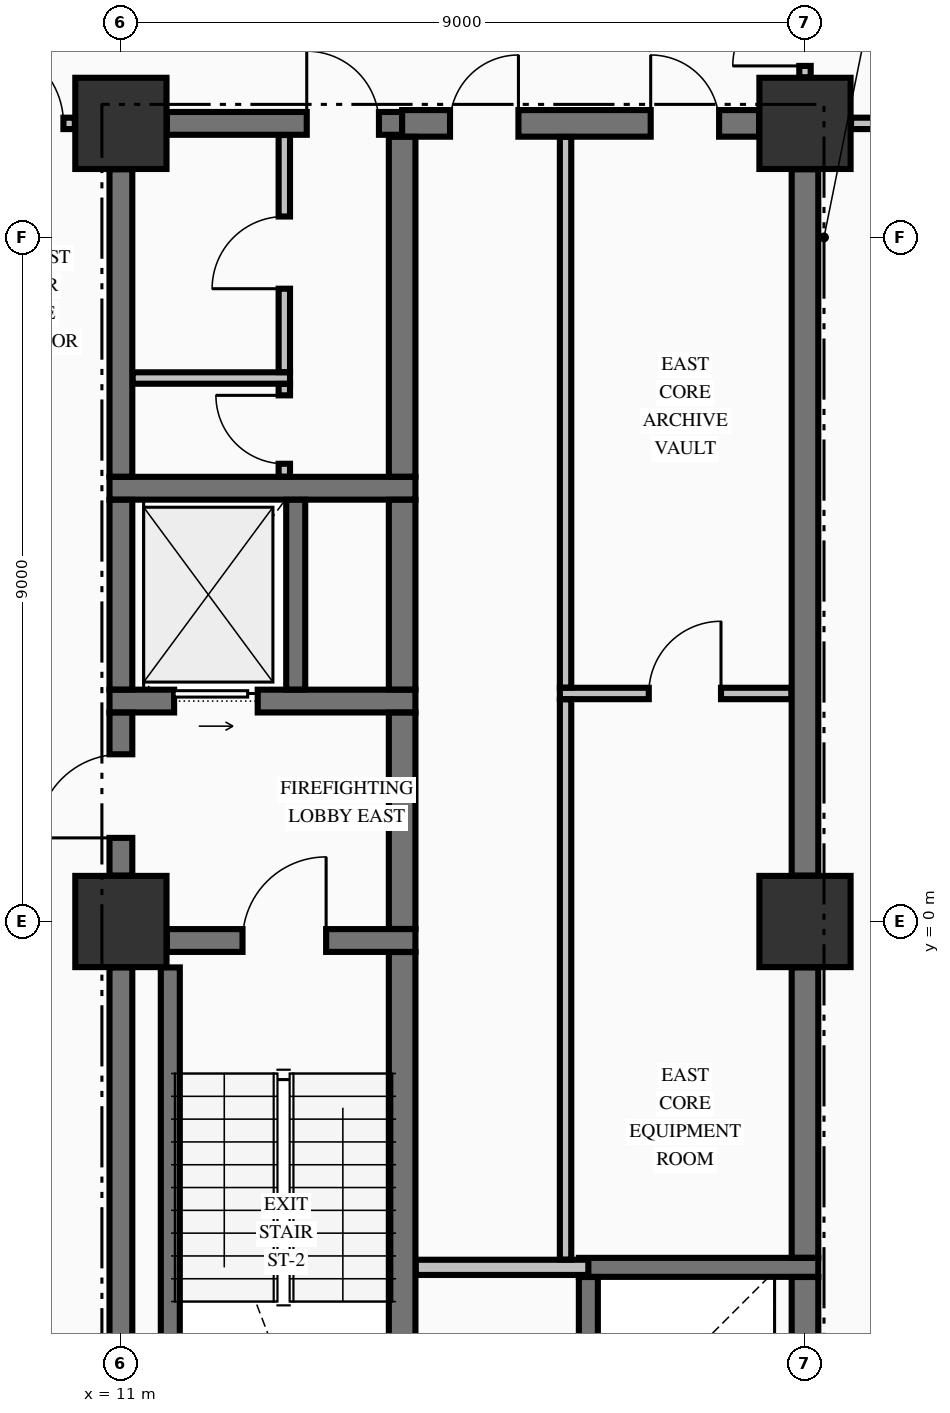
"""IFC4 building model, lengths in metres.
Left out: names, types, materials, properties, quantities, classifications, styles, units other than length and angle.
Written with IfcOpenShell. Run it as: python <this file> out.ifc"""

import sys

from ifc_helpers import new_model, si_unit, direction, frame, frame_2d, origin, origin_2d, place, context, subcontext, project, spatial, rectangle, extrude, element, fill, save


model = new_model("IFC4")
c1 = context("Model", 3, precision=1e-05, world=origin(), true_north=direction((0.0, 1.0)))
c2 = subcontext(c1, "Body", "Model", "MODEL_VIEW")
j1 = project(units=[si_unit("LENGTHUNIT", "METRE"), si_unit("PLANEANGLEUNIT", "RADIAN")], contexts=[c1])
p1 = place(None, origin())
s1 = spatial("IfcSite", under=j1, at=p1, CompositionType="ELEMENT")
p2 = place(p1, origin())
s2 = spatial("IfcBuilding", under=s1, at=p2, CompositionType="ELEMENT")
p3 = place(p2, frame((0.0, 0.0, 41.48)))
s3 = spatial("IfcBuildingStorey", under=s2, at=p3, CompositionType="ELEMENT", Elevation=41.48)
for number, where, z_axis, x_axis in (
    (1, (11.0, 0.0, -0.25), (0.0, 0.0, 1.0), (1.0, 0.0, 0.0)),
    (2, (11.0, 10.5, -0.25), (0.0, 0.0, 1.0), (1.0, 0.0, 0.0)),
    (3, (20.0, 10.5, -0.25), (0.0, 0.0, 1.0), (1.0, 0.0, 0.0)),
    (4, (20.0, 0.0, -0.25), (0.0, 0.0, 1.0), (1.0, 0.0, 0.0)),
):
    element("IfcColumn", number, at=place(p3, frame(where, z_axis=z_axis, x_axis=x_axis)), inside=s3, PredefinedType="COLUMN", context=c2, shape_type="SweptSolid", body=[
        extrude(rectangle(XDim=1.2, YDim=1.2, at=origin_2d()), origin(), (0.0, 0.0, 1.0), 3.57),
    ])
p4 = place(p3, frame((17.025, -4.55, 0.0), z_axis=(0.0, 0.0, 1.0), x_axis=(1.0, 0.0, 0.0)))
e5 = element("IfcWall", 5, at=p4, inside=s3, PredefinedType="SOLIDWALL", context=c2, shape_type="SweptSolid", body=[
    extrude(rectangle(XDim=3.15, YDim=0.25, at=frame_2d((1.575, 0.0))), origin(), (0.0, 0.0, 1.0), 3.32),
])
p5 = place(p3, frame((11.604, -0.25, 0.0), z_axis=(0.0, 0.0, 1.0), x_axis=(1.0, 0.0, 0.0)))
e6 = element("IfcWall", 6, at=p5, inside=s3, PredefinedType="SHEAR", context=c2, shape_type="SweptSolid", body=[
    extrude(rectangle(XDim=3.271, YDim=0.3, at=frame_2d((1.635, 0.0))), origin(), (0.0, 0.0, 1.0), 3.32),
])
p6 = place(p5, frame((0.996, 0.0, 0.0)))
e7 = element("IfcOpeningElement", 7, at=p6, cuts=e6, PredefinedType="OPENING", context=c2, shape_type="SweptSolid", body=[
    extrude(rectangle(XDim=1.1, YDim=2.15, at=frame_2d((0.55, 1.075))), frame((0.0, 0.16, 0.0), z_axis=(0.0, -1.0, 0.0), x_axis=(1.0, 0.0, 0.0)), (0.0, 0.0, 1.0), 0.32),
])
p7 = place(p3, frame((10.85, 2.9, 0.0), z_axis=(0.0, 0.0, 1.0), x_axis=(1.0, 0.0, 0.0)))
e8 = element("IfcWall", 8, at=p7, inside=s3, PredefinedType="SHEAR", context=c2, shape_type="SweptSolid", body=[
    extrude(rectangle(XDim=4.025, YDim=0.3, at=frame_2d((2.012, 0.0))), origin(), (0.0, 0.0, 1.0), 3.32),
])
p8 = place(p7, frame((0.85, 0.0, 0.0)))
e9 = element("IfcOpeningElement", 9, at=p8, cuts=e8, PredefinedType="OPENING", context=c2, shape_type="SweptSolid", body=[
    extrude(rectangle(XDim=1.1, YDim=2.2, at=frame_2d((0.55, 1.1))), frame((0.0, 0.16, 0.0), z_axis=(0.0, -1.0, 0.0), x_axis=(1.0, 0.0, 0.0)), (0.0, 0.0, 1.0), 0.32),
])
p9 = place(p3, frame((10.85, 5.7, 0.0), z_axis=(0.0, 0.0, 1.0), x_axis=(1.0, 0.0, 0.0)))
e10 = element("IfcWall", 10, at=p9, inside=s3, PredefinedType="SHEAR", context=c2, shape_type="SweptSolid", body=[
    extrude(rectangle(XDim=4.025, YDim=0.3, at=frame_2d((2.012, 0.0))), origin(), (0.0, 0.0, 1.0), 3.32),
])
p10 = place(p3, frame((11.604, 10.5, 0.0), z_axis=(0.0, 0.0, 1.0), x_axis=(1.0, 0.0, 0.0)))
e11 = element("IfcWall", 11, at=p10, inside=s3, PredefinedType="SHEAR", context=c2, shape_type="SweptSolid", body=[
    extrude(rectangle(XDim=3.096, YDim=0.3, at=frame_2d((1.548, 0.0))), origin(), (0.0, 0.0, 1.0), 3.32),
])
p11 = place(p10, frame((1.841, 0.0, 0.0)))
e12 = element("IfcOpeningElement", 12, at=p11, cuts=e11, PredefinedType="OPENING", context=c2, shape_type="SweptSolid", body=[
    extrude(rectangle(XDim=0.95, YDim=2.15, at=frame_2d((0.475, 1.075))), frame((0.0, 0.16, 0.0), z_axis=(0.0, -1.0, 0.0), x_axis=(1.0, 0.0, 0.0)), (0.0, 0.0, 1.0), 0.32),
])
p12 = place(p3, frame((14.7, 10.5, 0.0), z_axis=(0.0, 0.0, 1.0), x_axis=(1.0, 0.0, 0.0)))
e13 = element("IfcWall", 13, at=p12, inside=s3, PredefinedType="SHEAR", context=c2, shape_type="SweptSolid", body=[
    extrude(rectangle(XDim=4.696, YDim=0.35, at=frame_2d((2.348, 0.0))), origin(), (0.0, 0.0, 1.0), 3.32),
])
p13 = place(p12, frame((0.63, 0.0, 0.0)))
e14 = element("IfcOpeningElement", 14, at=p13, cuts=e13, PredefinedType="OPENING", context=c2, shape_type="SweptSolid", body=[
    extrude(rectangle(XDim=0.9, YDim=2.15, at=frame_2d((0.45, 1.075))), frame((0.0, 0.185, 0.0), z_axis=(0.0, -1.0, 0.0), x_axis=(1.0, 0.0, 0.0)), (0.0, 0.0, 1.0), 0.37),
])
p14 = place(p12, frame((3.27, 0.0, 0.0)))
e15 = element("IfcOpeningElement", 15, at=p14, cuts=e13, PredefinedType="OPENING", context=c2, shape_type="SweptSolid", body=[
    extrude(rectangle(XDim=0.9, YDim=2.15, at=frame_2d((0.45, 1.075))), frame((0.0, 0.185, 0.0), z_axis=(0.0, -1.0, 0.0), x_axis=(1.0, 0.0, 0.0)), (0.0, 0.0, 1.0), 0.37),
])
p15 = place(p3, frame((14.878, -4.55, 0.0), z_axis=(0.0, 0.0, 1.0), x_axis=(1.0, 0.0, 0.0)))
e16 = element("IfcWall", 16, at=p15, inside=s3, PredefinedType="PARTITIONING", context=c2, shape_type="SweptSolid", body=[
    extrude(rectangle(XDim=2.272, YDim=0.2, at=frame_2d((1.136, 0.0))), origin(), (0.0, 0.0, 1.0), 3.32),
])
p16 = place(p3, frame((16.775, 3.0, 0.0), z_axis=(0.0, 0.0, 1.0), x_axis=(1.0, 0.0, 0.0)))
e17 = element("IfcWall", 17, at=p16, inside=s3, PredefinedType="PARTITIONING", context=c2, shape_type="SweptSolid", body=[
    extrude(rectangle(XDim=3.047, YDim=0.15, at=frame_2d((1.523, 0.0))), origin(), (0.0, 0.0, 1.0), 3.32),
])
p17 = place(p16, frame((1.17, 0.0, 0.0)))
e18 = element("IfcOpeningElement", 18, at=p17, cuts=e17, PredefinedType="OPENING", context=c2, shape_type="SweptSolid", body=[
    extrude(rectangle(XDim=0.95, YDim=2.15, at=frame_2d((0.475, 1.075))), frame((0.0, 0.085, 0.0), z_axis=(0.0, -1.0, 0.0), x_axis=(1.0, 0.0, 0.0)), (0.0, 0.0, 1.0), 0.17),
])
p18 = place(p3, frame((11.153, 7.15, 0.0), z_axis=(0.0, 0.0, 1.0), x_axis=(1.0, 0.0, 0.0)))
e19 = element("IfcWall", 19, at=p18, inside=s3, PredefinedType="PARTITIONING", context=c2, shape_type="SweptSolid", body=[
    extrude(rectangle(XDim=2.072, YDim=0.15, at=frame_2d((1.036, 0.0))), origin(), (0.0, 0.0, 1.0), 3.32),
])
p19 = place(p3, frame((-10.394, 10.5, 0.0), z_axis=(0.0, 0.0, 1.0), x_axis=(1.0, 0.0, 0.0)))
e20 = element("IfcWall", 20, at=p19, inside=s3, PredefinedType="PARTITIONING", context=c2, shape_type="SweptSolid", body=[
    extrude(rectangle(XDim=20.788, YDim=0.15, at=frame_2d((10.394, 0.0))), origin(), (0.0, 0.0, 1.0), 3.32),
])
p20 = place(p19, frame((0.15, 0.0, 0.0)))
e21 = element("IfcOpeningElement", 21, at=p20, cuts=e20, PredefinedType="OPENING", context=c2, shape_type="SweptSolid", body=[
    extrude(rectangle(XDim=1.05, YDim=2.15, at=frame_2d((0.525, 1.075))), frame((0.0, 0.085, 0.0), z_axis=(0.0, -1.0, 0.0), x_axis=(1.0, 0.0, 0.0)), (0.0, 0.0, 1.0), 0.17),
])
p21 = place(p19, frame((19.588, 0.0, 0.0)))
e22 = element("IfcOpeningElement", 22, at=p21, cuts=e20, PredefinedType="OPENING", context=c2, shape_type="SweptSolid", body=[
    extrude(rectangle(XDim=1.05, YDim=2.15, at=frame_2d((0.525, 1.075))), frame((0.0, 0.085, 0.0), z_axis=(0.0, -1.0, 0.0), x_axis=(1.0, 0.0, 0.0)), (0.0, 0.0, 1.0), 0.17),
])
p22 = place(p3, frame((20.606, 10.5, 0.0), z_axis=(0.0, 0.0, 1.0), x_axis=(1.0, 0.0, 0.0)))
e23 = element("IfcWall", 23, at=p22, inside=s3, PredefinedType="PARTITIONING", context=c2, shape_type="SweptSolid", body=[
    extrude(rectangle(XDim=8.229, YDim=0.15, at=frame_2d((4.115, 0.0))), origin(), (0.0, 0.0, 1.0), 3.32),
])
p23 = place(p22, frame((3.394, 0.0, 0.0)))
e24 = element("IfcOpeningElement", 24, at=p23, cuts=e23, PredefinedType="OPENING", context=c2, shape_type="SweptSolid", body=[
    extrude(rectangle(XDim=1.0, YDim=2.15, at=frame_2d((0.5, 1.075))), frame((0.0, 0.085, 0.0), z_axis=(0.0, -1.0, 0.0), x_axis=(1.0, 0.0, 0.0)), (0.0, 0.0, 1.0), 0.17),
])
p24 = place(p3, frame((11.0, -9.346, 0.0), z_axis=(0.0, 0.0, 1.0), x_axis=(0.0, 1.0, 0.0)))
e25 = element("IfcWall", 25, at=p24, inside=s3, PredefinedType="SHEAR", context=c2, shape_type="SweptSolid", body=[
    extrude(rectangle(XDim=8.742, YDim=0.3, at=frame_2d((4.371, 0.0))), origin(), (0.0, 0.0, 1.0), 3.32),
])
p25 = place(p3, frame((11.0, 0.604, 0.0), z_axis=(0.0, 0.0, 1.0), x_axis=(0.0, 1.0, 0.0)))
e26 = element("IfcWall", 26, at=p25, inside=s3, PredefinedType="SHEAR", context=c2, shape_type="SweptSolid", body=[
    extrude(rectangle(XDim=2.144, YDim=0.3, at=frame_2d((1.072, 0.0))), origin(), (0.0, 0.0, 1.0), 3.32),
])
p26 = place(p25, frame((0.496, 0.0, 0.0)))
e27 = element("IfcOpeningElement", 27, at=p26, cuts=e26, PredefinedType="OPENING", context=c2, shape_type="SweptSolid", body=[
    extrude(rectangle(XDim=1.1, YDim=2.15, at=frame_2d((0.55, 1.075))), frame((0.0, 0.16, 0.0), z_axis=(0.0, -1.0, 0.0), x_axis=(1.0, 0.0, 0.0)), (0.0, 0.0, 1.0), 0.32),
])
p27 = place(p3, frame((11.0, 3.052, 0.0), z_axis=(0.0, 0.0, 1.0), x_axis=(0.0, 1.0, 0.0)))
e28 = element("IfcWall", 28, at=p27, inside=s3, PredefinedType="SHEAR", context=c2, shape_type="SweptSolid", body=[
    extrude(rectangle(XDim=2.496, YDim=0.3, at=frame_2d((1.248, 0.0))), origin(), (0.0, 0.0, 1.0), 3.32),
])
p28 = place(p3, frame((11.0, 5.852, 0.0), z_axis=(0.0, 0.0, 1.0), x_axis=(0.0, 1.0, 0.0)))
e29 = element("IfcWall", 29, at=p28, inside=s3, PredefinedType="SHEAR", context=c2, shape_type="SweptSolid", body=[
    extrude(rectangle(XDim=4.044, YDim=0.3, at=frame_2d((2.022, 0.0))), origin(), (0.0, 0.0, 1.0), 3.32),
])
p29 = place(p3, frame((11.65, -9.346, 0.0), z_axis=(0.0, 0.0, 1.0), x_axis=(0.0, 1.0, 0.0)))
e30 = element("IfcWall", 30, at=p29, inside=s3, PredefinedType="SOLIDWALL", context=c2, shape_type="SweptSolid", body=[
    extrude(rectangle(XDim=8.742, YDim=0.25, at=frame_2d((4.371, 0.0))), origin(), (0.0, 0.0, 1.0), 3.32),
])
p30 = place(p3, frame((13.3, 3.052, 0.0), z_axis=(0.0, 0.0, 1.0), x_axis=(0.0, 1.0, 0.0)))
e31 = element("IfcWall", 31, at=p30, inside=s3, PredefinedType="SOLIDWALL", context=c2, shape_type="SweptSolid", body=[
    extrude(rectangle(XDim=2.496, YDim=0.25, at=frame_2d((1.248, 0.0))), origin(), (0.0, 0.0, 1.0), 3.32),
])
p31 = place(p3, frame((14.7, -9.773, 0.0), z_axis=(0.0, 0.0, 1.0), x_axis=(0.0, 1.0, 0.0)))
e32 = element("IfcWall", 32, at=p31, inside=s3, PredefinedType="SHEAR", context=c2, shape_type="SweptSolid", body=[
    extrude(rectangle(XDim=9.371, YDim=0.35, at=frame_2d((4.686, 0.0))), origin(), (0.0, 0.0, 1.0), 3.32),
])
p32 = place(p3, frame((14.7, -0.098, 0.0), z_axis=(0.0, 0.0, 1.0), x_axis=(0.0, 1.0, 0.0)))
e33 = element("IfcWall", 33, at=p32, inside=s3, PredefinedType="SHEAR", context=c2, shape_type="SweptSolid", body=[
    extrude(rectangle(XDim=2.846, YDim=0.35, at=frame_2d((1.423, 0.0))), origin(), (0.0, 0.0, 1.0), 3.32),
])
p33 = place(p3, frame((14.7, 3.052, 0.0), z_axis=(0.0, 0.0, 1.0), x_axis=(0.0, 1.0, 0.0)))
e34 = element("IfcWall", 34, at=p33, inside=s3, PredefinedType="SHEAR", context=c2, shape_type="SweptSolid", body=[
    extrude(rectangle(XDim=2.496, YDim=0.35, at=frame_2d((1.248, 0.0))), origin(), (0.0, 0.0, 1.0), 3.32),
])
p34 = place(p3, frame((14.7, 5.852, 0.0), z_axis=(0.0, 0.0, 1.0), x_axis=(0.0, 1.0, 0.0)))
e35 = element("IfcWall", 35, at=p34, inside=s3, PredefinedType="SHEAR", context=c2, shape_type="SweptSolid", body=[
    extrude(rectangle(XDim=4.471, YDim=0.35, at=frame_2d((2.235, 0.0))), origin(), (0.0, 0.0, 1.0), 3.32),
])
p35 = place(p3, frame((17.15, -6.923, 0.0), z_axis=(0.0, 0.0, 1.0), x_axis=(0.0, 1.0, 0.0)))
e36 = element("IfcWall", 36, at=p35, inside=s3, PredefinedType="SOLIDWALL", context=c2, shape_type="SweptSolid", body=[
    extrude(rectangle(XDim=2.246, YDim=0.25, at=frame_2d((1.123, 0.0))), origin(), (0.0, 0.0, 1.0), 3.32),
])
p36 = place(p3, frame((20.0, -6.923, 0.0), z_axis=(0.0, 0.0, 1.0), x_axis=(0.0, 1.0, 0.0)))
e37 = element("IfcWall", 37, at=p36, inside=s3, PredefinedType="SHEAR", context=c2, shape_type="SweptSolid", body=[
    extrude(rectangle(XDim=2.246, YDim=0.35, at=frame_2d((1.123, 0.0))), origin(), (0.0, 0.0, 1.0), 3.32),
])
p37 = place(p3, frame((20.0, -4.423, 0.0), z_axis=(0.0, 0.0, 1.0), x_axis=(0.0, 1.0, 0.0)))
e38 = element("IfcWall", 38, at=p37, inside=s3, PredefinedType="SHEAR", context=c2, shape_type="SweptSolid", body=[
    extrude(rectangle(XDim=3.819, YDim=0.35, at=frame_2d((1.91, 0.0))), origin(), (0.0, 0.0, 1.0), 3.32),
])
p38 = place(p3, frame((20.0, 0.604, 0.0), z_axis=(0.0, 0.0, 1.0), x_axis=(0.0, 1.0, 0.0)))
e39 = element("IfcWall", 39, at=p38, inside=s3, PredefinedType="SHEAR", context=c2, shape_type="SweptSolid", body=[
    extrude(rectangle(XDim=9.292, YDim=0.35, at=frame_2d((4.646, 0.0))), origin(), (0.0, 0.0, 1.0), 3.32),
])
p39 = place(p3, frame((13.15, 5.853, 0.0), z_axis=(0.0, 0.0, 1.0), x_axis=(0.0, 1.0, 0.0)))
e40 = element("IfcWall", 40, at=p39, inside=s3, PredefinedType="PARTITIONING", context=c2, shape_type="SweptSolid", body=[
    extrude(rectangle(XDim=1.219, YDim=0.15, at=frame_2d((0.609, 0.0))), origin(), (0.0, 0.0, 1.0), 3.32),
])
p40 = place(p39, frame((0.169, 0.0, 0.0)))
e41 = element("IfcOpeningElement", 41, at=p40, cuts=e40, PredefinedType="OPENING", context=c2, shape_type="SweptSolid", body=[
    extrude(rectangle(XDim=0.9, YDim=2.15, at=frame_2d((0.45, 1.075))), frame((0.0, 0.085, 0.0), z_axis=(0.0, -1.0, 0.0), x_axis=(1.0, 0.0, 0.0)), (0.0, 0.0, 1.0), 0.17),
])
p41 = place(p3, frame((13.15, 7.228, 0.0), z_axis=(0.0, 0.0, 1.0), x_axis=(0.0, 1.0, 0.0)))
e42 = element("IfcWall", 42, at=p41, inside=s3, PredefinedType="PARTITIONING", context=c2, shape_type="SweptSolid", body=[
    extrude(rectangle(XDim=3.119, YDim=0.15, at=frame_2d((1.56, 0.0))), origin(), (0.0, 0.0, 1.0), 3.32),
])
p42 = place(p41, frame((1.097, 0.0, 0.0)))
e43 = element("IfcOpeningElement", 43, at=p42, cuts=e42, PredefinedType="OPENING", context=c2, shape_type="SweptSolid", body=[
    extrude(rectangle(XDim=0.95, YDim=2.15, at=frame_2d((0.475, 1.075))), frame((0.0, 0.085, 0.0), z_axis=(0.0, -1.0, 0.0), x_axis=(1.0, 0.0, 0.0)), (0.0, 0.0, 1.0), 0.17),
])
p43 = place(p3, frame((16.85, -4.447, 0.0), z_axis=(0.0, 0.0, 1.0), x_axis=(0.0, 1.0, 0.0)))
e44 = element("IfcWall", 44, at=p43, inside=s3, PredefinedType="PARTITIONING", context=c2, shape_type="SweptSolid", body=[
    extrude(rectangle(XDim=7.369, YDim=0.15, at=frame_2d((3.685, 0.0))), origin(), (0.0, 0.0, 1.0), 3.32),
])
p44 = place(p3, frame((16.85, 3.078, 0.0), z_axis=(0.0, 0.0, 1.0), x_axis=(0.0, 1.0, 0.0)))
e45 = element("IfcWall", 45, at=p44, inside=s3, PredefinedType="PARTITIONING", context=c2, shape_type="SweptSolid", body=[
    extrude(rectangle(XDim=7.244, YDim=0.15, at=frame_2d((3.622, 0.0))), origin(), (0.0, 0.0, 1.0), 3.32),
])
p45 = place(p3, frame((20.0, 11.106, 0.0), z_axis=(0.0, 0.0, 1.0), x_axis=(0.0, 1.0, 0.0)))
e46 = element("IfcWall", 46, at=p45, inside=s3, PredefinedType="PARTITIONING", context=c2, shape_type="SweptSolid", body=[
    extrude(rectangle(XDim=1.766, YDim=0.15, at=frame_2d((0.883, 0.0))), origin(), (0.0, 0.0, 1.0), 2.66),
])
p46 = place(p45, frame((0.15, 0.0, 0.0)))
e47 = element("IfcOpeningElement", 47, at=p46, cuts=e46, PredefinedType="OPENING", context=c2, shape_type="SweptSolid", body=[
    extrude(rectangle(XDim=0.95, YDim=2.15, at=frame_2d((0.475, 1.075))), frame((0.0, 0.085, 0.0), z_axis=(0.0, -1.0, 0.0), x_axis=(1.0, 0.0, 0.0)), (0.0, 0.0, 1.0), 0.17),
])
p47 = place(p6, origin())
e48 = element("IfcDoor", 48, at=p47, inside=s3, OperationType="SINGLE_SWING_RIGHT", PredefinedType="DOOR", context=c2, shape_type="SweptSolid", body=[
    extrude(rectangle(XDim=1.1, YDim=2.15, at=frame_2d((0.55, 1.075))), frame((0.0, 0.025, 0.0), z_axis=(0.0, -1.0, 0.0), x_axis=(1.0, 0.0, 0.0)), (0.0, 0.0, 1.0), 0.05),
])
fill(e7, e48)
p48 = place(p26, origin())
e49 = element("IfcDoor", 49, at=p48, inside=s3, OperationType="SINGLE_SWING_LEFT", PredefinedType="DOOR", context=c2, shape_type="SweptSolid", body=[
    extrude(rectangle(XDim=1.1, YDim=2.15, at=frame_2d((0.55, 1.075))), frame((0.0, 0.025, 0.0), z_axis=(0.0, -1.0, 0.0), x_axis=(1.0, 0.0, 0.0)), (0.0, 0.0, 1.0), 0.05),
])
fill(e27, e49)
p49 = place(p8, origin())
e50 = element("IfcDoor", 50, at=p49, inside=s3, OperationType="SLIDING_TO_RIGHT", PredefinedType="DOOR", context=c2, shape_type="SweptSolid", body=[
    extrude(rectangle(XDim=1.1, YDim=2.2, at=frame_2d((0.55, 1.1))), frame((0.0, 0.025, 0.0), z_axis=(0.0, -1.0, 0.0), x_axis=(1.0, 0.0, 0.0)), (0.0, 0.0, 1.0), 0.05),
])
fill(e9, e50)
p50 = place(p11, origin())
e51 = element("IfcDoor", 51, at=p50, inside=s3, OperationType="SINGLE_SWING_LEFT", PredefinedType="DOOR", context=c2, shape_type="SweptSolid", body=[
    extrude(rectangle(XDim=0.95, YDim=2.15, at=frame_2d((0.475, 1.075))), frame((0.0, 0.025, 0.0), z_axis=(0.0, -1.0, 0.0), x_axis=(1.0, 0.0, 0.0)), (0.0, 0.0, 1.0), 0.05),
])
fill(e12, e51)
p51 = place(p40, origin())
e52 = element("IfcDoor", 52, at=p51, inside=s3, OperationType="SINGLE_SWING_RIGHT", PredefinedType="DOOR", context=c2, shape_type="SweptSolid", body=[
    extrude(rectangle(XDim=0.9, YDim=2.15, at=frame_2d((0.45, 1.075))), frame((0.0, 0.025, 0.0), z_axis=(0.0, -1.0, 0.0), x_axis=(1.0, 0.0, 0.0)), (0.0, 0.0, 1.0), 0.05),
])
fill(e41, e52)
p52 = place(p42, origin())
e53 = element("IfcDoor", 53, at=p52, inside=s3, OperationType="SINGLE_SWING_LEFT", PredefinedType="DOOR", context=c2, shape_type="SweptSolid", body=[
    extrude(rectangle(XDim=0.95, YDim=2.15, at=frame_2d((0.475, 1.075))), frame((0.0, 0.025, 0.0), z_axis=(0.0, -1.0, 0.0), x_axis=(1.0, 0.0, 0.0)), (0.0, 0.0, 1.0), 0.05),
])
fill(e43, e53)
p53 = place(p13, origin())
e54 = element("IfcDoor", 54, at=p53, inside=s3, OperationType="SINGLE_SWING_RIGHT", PredefinedType="DOOR", context=c2, shape_type="SweptSolid", body=[
    extrude(rectangle(XDim=0.9, YDim=2.15, at=frame_2d((0.45, 1.075))), frame((0.0, 0.025, 0.0), z_axis=(0.0, -1.0, 0.0), x_axis=(1.0, 0.0, 0.0)), (0.0, 0.0, 1.0), 0.05),
])
fill(e14, e54)
p54 = place(p14, origin())
e55 = element("IfcDoor", 55, at=p54, inside=s3, OperationType="SINGLE_SWING_LEFT", PredefinedType="DOOR", context=c2, shape_type="SweptSolid", body=[
    extrude(rectangle(XDim=0.9, YDim=2.15, at=frame_2d((0.45, 1.075))), frame((0.0, 0.025, 0.0), z_axis=(0.0, -1.0, 0.0), x_axis=(1.0, 0.0, 0.0)), (0.0, 0.0, 1.0), 0.05),
])
fill(e15, e55)
p55 = place(p17, origin())
e56 = element("IfcDoor", 56, at=p55, inside=s3, OperationType="SINGLE_SWING_RIGHT", PredefinedType="DOOR", context=c2, shape_type="SweptSolid", body=[
    extrude(rectangle(XDim=0.95, YDim=2.15, at=frame_2d((0.475, 1.075))), frame((0.0, 0.025, 0.0), z_axis=(0.0, -1.0, 0.0), x_axis=(1.0, 0.0, 0.0)), (0.0, 0.0, 1.0), 0.05),
])
fill(e18, e56)
p56 = place(p21, origin())
e57 = element("IfcDoor", 57, at=p56, inside=s3, OperationType="SINGLE_SWING_LEFT", PredefinedType="DOOR", context=c2, shape_type="SweptSolid", body=[
    extrude(rectangle(XDim=1.05, YDim=2.15, at=frame_2d((0.525, 1.075))), frame((0.0, 0.025, 0.0), z_axis=(0.0, -1.0, 0.0), x_axis=(1.0, 0.0, 0.0)), (0.0, 0.0, 1.0), 0.05),
])
fill(e22, e57)
p57 = place(p46, origin())
e58 = element("IfcDoor", 58, at=p57, inside=s3, OperationType="SINGLE_SWING_LEFT", PredefinedType="DOOR", context=c2, shape_type="SweptSolid", body=[
    extrude(rectangle(XDim=0.95, YDim=2.15, at=frame_2d((0.475, 1.075))), frame((0.0, 0.025, 0.0), z_axis=(0.0, -1.0, 0.0), x_axis=(1.0, 0.0, 0.0)), (0.0, 0.0, 1.0), 0.05),
])
fill(e47, e58)
save(model, sys.argv[1])
